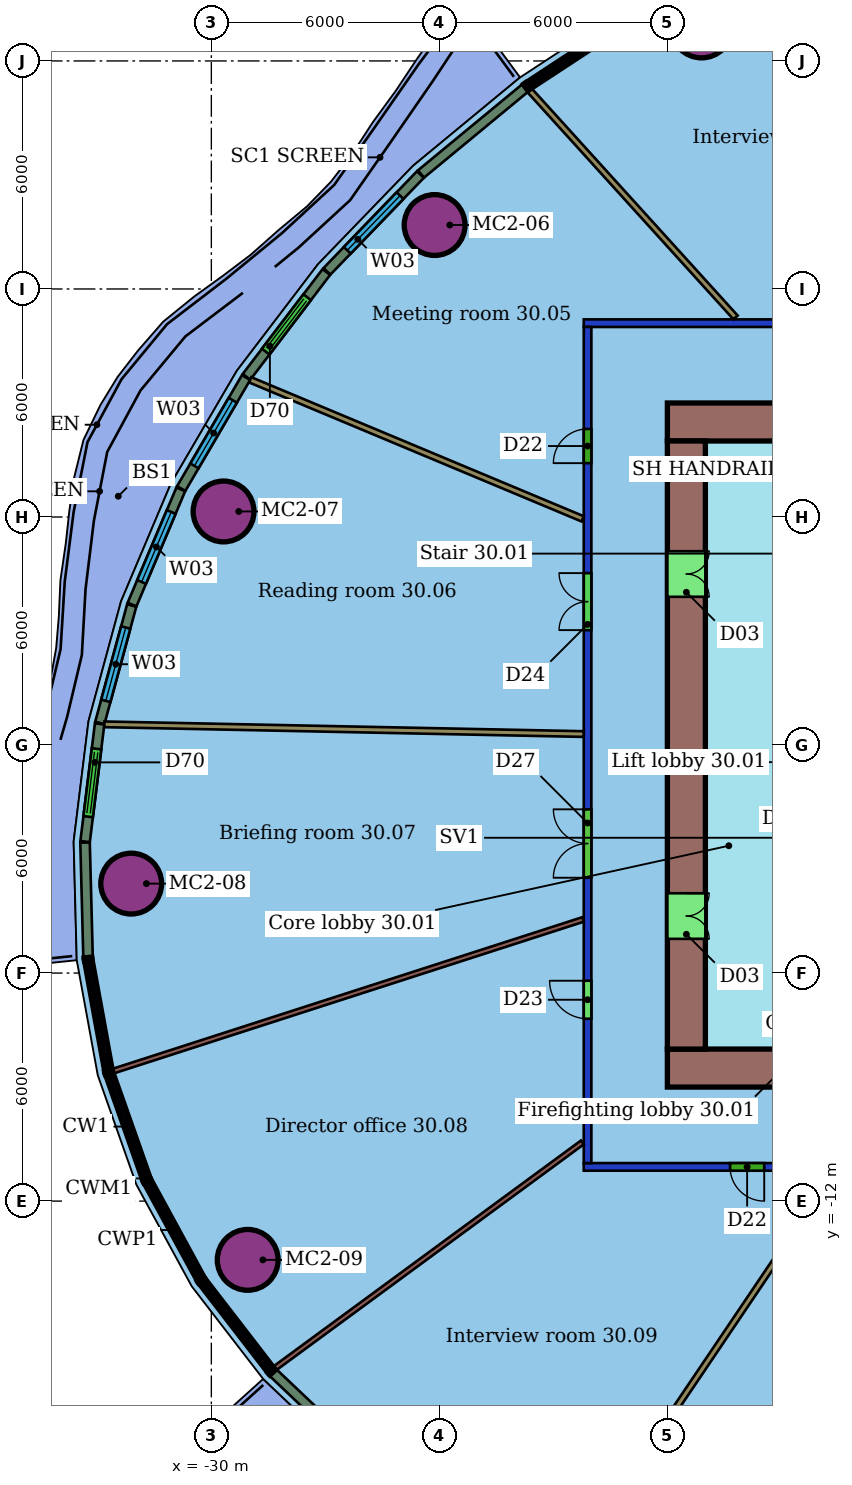
"""IFC4 building model, lengths in metres.
Left out: names, types, materials, properties, quantities, classifications, styles, units other than length and angle.
Written with IfcOpenShell. Run it as: python <this file> out.ifc"""

import sys

from ifc_helpers import new_model, si_unit, direction, frame, frame_2d, origin, origin_2d, place, context, subcontext, project, spatial, rectangle, hollow_circle, extrude, element, fill, save


model = new_model("IFC4")
c1 = context("Model", 3, precision=1e-05, world=origin(), true_north=direction((0.0, 1.0)))
c2 = subcontext(c1, "Body", "Model", "MODEL_VIEW")
j1 = project(units=[si_unit("LENGTHUNIT", "METRE"), si_unit("PLANEANGLEUNIT", "RADIAN")], contexts=[c1])
p1 = place(None, origin())
s1 = spatial("IfcSite", under=j1, at=p1, CompositionType="ELEMENT")
p2 = place(p1, origin())
s2 = spatial("IfcBuilding", under=s1, at=p2, CompositionType="ELEMENT")
p3 = place(p2, frame((0.0, 0.0, 128.2)))
s3 = spatial("IfcBuildingStorey", under=s2, at=p3, CompositionType="ELEMENT", Elevation=128.2)
for number, where, z_axis, x_axis in (
    (1, (-17.1, 18.881, 0.0), (0.0, 0.0, 1.0), (1.0, 0.0, 0.0)),
    (2, (-24.125, 13.683, 0.0), (0.0, 0.0, 1.0), (1.0, 0.0, 0.0)),
    (3, (-29.679, 6.146, 0.0), (0.0, 0.0, 1.0), (1.0, 0.0, 0.0)),
    (4, (-32.109, -3.646, 0.0), (0.0, 0.0, 1.0), (1.0, 0.0, 0.0)),
    (5, (-29.043, -13.547, 0.0), (0.0, 0.0, 1.0), (1.0, 0.0, 0.0)),
):
    element("IfcColumn", number, at=place(p3, frame(where, z_axis=z_axis, x_axis=x_axis)), inside=s3, PredefinedType="COLUMN", context=c2, shape_type="SweptSolid", body=[
        extrude(hollow_circle(Radius=0.8, WallThickness=0.055, at=origin_2d()), origin(), (0.0, 0.0, 1.0), 3.45),
    ])
p4 = place(p3, frame((8.2, -11.1, 0.0), z_axis=(0.0, 0.0, 1.0), x_axis=(-1.0, 0.0, 0.0)))
e6 = element("IfcWall", 6, at=p4, inside=s3, PredefinedType="PARTITIONING", context=c2, shape_type="SweptSolid", body=[
    extrude(rectangle(XDim=28.4, YDim=0.2, at=frame_2d((14.2, 0.0))), origin(), (0.0, 0.0, 1.0), 3.0),
])
p5 = place(p4, frame((23.651, 0.0, 0.0)))
e7 = element("IfcOpeningElement", 7, at=p5, cuts=e6, PredefinedType="OPENING", context=c2, shape_type="SweptSolid", body=[
    extrude(rectangle(XDim=0.9, YDim=2.1, at=frame_2d((0.45, 1.05))), frame((0.0, 0.11, 0.0), z_axis=(0.0, -1.0, 0.0), x_axis=(1.0, 0.0, 0.0)), (0.0, 0.0, 1.0), 0.22),
])
p6 = place(p4, frame((19.365, 0.0, 0.0)))
e8 = element("IfcOpeningElement", 8, at=p6, cuts=e6, PredefinedType="OPENING", context=c2, shape_type="SweptSolid", body=[
    extrude(rectangle(XDim=0.9, YDim=2.1, at=frame_2d((0.45, 1.05))), frame((0.0, 0.11, 0.0), z_axis=(0.0, -1.0, 0.0), x_axis=(1.0, 0.0, 0.0)), (0.0, 0.0, 1.0), 0.22),
])
p7 = place(p4, frame((14.083, 0.0, 0.0)))
e9 = element("IfcOpeningElement", 9, at=p7, cuts=e6, PredefinedType="OPENING", context=c2, shape_type="SweptSolid", body=[
    extrude(rectangle(XDim=0.9, YDim=2.1, at=frame_2d((0.45, 1.05))), frame((0.0, 0.11, 0.0), z_axis=(0.0, -1.0, 0.0), x_axis=(1.0, 0.0, 0.0)), (0.0, 0.0, 1.0), 0.22),
])
p8 = place(p4, frame((8.278, 0.0, 0.0)))
e10 = element("IfcOpeningElement", 10, at=p8, cuts=e6, PredefinedType="OPENING", context=c2, shape_type="SweptSolid", body=[
    extrude(rectangle(XDim=0.9, YDim=2.1, at=frame_2d((0.45, 1.05))), frame((0.0, 0.11, 0.0), z_axis=(0.0, -1.0, 0.0), x_axis=(1.0, 0.0, 0.0)), (0.0, 0.0, 1.0), 0.22),
])
p9 = place(p3, frame((-20.1, -11.0, 0.0), z_axis=(0.0, 0.0, 1.0), x_axis=(0.0, 1.0, 0.0)))
e11 = element("IfcWall", 11, at=p9, inside=s3, PredefinedType="PARTITIONING", context=c2, shape_type="SweptSolid", body=[
    extrude(rectangle(XDim=22.0, YDim=0.2, at=frame_2d((11.0, 0.0))), origin(), (0.0, 0.0, 1.0), 3.0),
])
p10 = place(p9, frame((18.417, 0.0, 0.0)))
e12 = element("IfcOpeningElement", 12, at=p10, cuts=e11, PredefinedType="OPENING", context=c2, shape_type="SweptSolid", body=[
    extrude(rectangle(XDim=0.9, YDim=2.1, at=frame_2d((0.45, 1.05))), frame((0.0, 0.11, 0.0), z_axis=(0.0, -1.0, 0.0), x_axis=(1.0, 0.0, 0.0)), (0.0, 0.0, 1.0), 0.22),
])
p11 = place(p9, frame((14.024, 0.0, 0.0)))
e13 = element("IfcOpeningElement", 13, at=p11, cuts=e11, PredefinedType="OPENING", context=c2, shape_type="SweptSolid", body=[
    extrude(rectangle(XDim=1.5, YDim=2.1, at=frame_2d((0.75, 1.05))), frame((0.0, 0.11, 0.0), z_axis=(0.0, -1.0, 0.0), x_axis=(1.0, 0.0, 0.0)), (0.0, 0.0, 1.0), 0.22),
])
p12 = place(p9, frame((7.508, 0.0, 0.0)))
e14 = element("IfcOpeningElement", 14, at=p12, cuts=e11, PredefinedType="OPENING", context=c2, shape_type="SweptSolid", body=[
    extrude(rectangle(XDim=1.8, YDim=2.4, at=frame_2d((0.9, 1.2))), frame((0.0, 0.11, 0.0), z_axis=(0.0, -1.0, 0.0), x_axis=(1.0, 0.0, 0.0)), (0.0, 0.0, 1.0), 0.22),
])
p13 = place(p9, frame((3.798, 0.0, 0.0)))
e15 = element("IfcOpeningElement", 15, at=p13, cuts=e11, PredefinedType="OPENING", context=c2, shape_type="SweptSolid", body=[
    extrude(rectangle(XDim=1.0, YDim=2.4, at=frame_2d((0.5, 1.2))), frame((0.0, 0.11, 0.0), z_axis=(0.0, -1.0, 0.0), x_axis=(1.0, 0.0, 0.0)), (0.0, 0.0, 1.0), 0.22),
])
p14 = place(p3, frame((-20.2, 11.1, 0.0), z_axis=(0.0, 0.0, 1.0), x_axis=(1.0, 0.0, 0.0)))
e16 = element("IfcWall", 16, at=p14, inside=s3, PredefinedType="PARTITIONING", context=c2, shape_type="SweptSolid", body=[
    extrude(rectangle(XDim=28.4, YDim=0.2, at=frame_2d((14.2, 0.0))), origin(), (0.0, 0.0, 1.0), 3.0),
])
p15 = place(p14, frame((23.376, 0.0, 0.0)))
e17 = element("IfcOpeningElement", 17, at=p15, cuts=e16, PredefinedType="OPENING", context=c2, shape_type="SweptSolid", body=[
    extrude(rectangle(XDim=1.8, YDim=2.4, at=frame_2d((0.9, 1.2))), frame((0.0, 0.11, 0.0), z_axis=(0.0, -1.0, 0.0), x_axis=(1.0, 0.0, 0.0)), (0.0, 0.0, 1.0), 0.22),
])
p16 = place(p14, frame((19.3, 0.0, 0.0)))
e18 = element("IfcOpeningElement", 18, at=p16, cuts=e16, PredefinedType="OPENING", context=c2, shape_type="SweptSolid", body=[
    extrude(rectangle(XDim=1.0, YDim=2.4, at=frame_2d((0.5, 1.2))), frame((0.0, 0.11, 0.0), z_axis=(0.0, -1.0, 0.0), x_axis=(1.0, 0.0, 0.0)), (0.0, 0.0, 1.0), 0.22),
])
p17 = place(p14, frame((12.52, 0.0, 0.0)))
e19 = element("IfcOpeningElement", 19, at=p17, cuts=e16, PredefinedType="OPENING", context=c2, shape_type="SweptSolid", body=[
    extrude(rectangle(XDim=1.5, YDim=2.1, at=frame_2d((0.75, 1.05))), frame((0.0, 0.11, 0.0), z_axis=(0.0, -1.0, 0.0), x_axis=(1.0, 0.0, 0.0)), (0.0, 0.0, 1.0), 0.22),
])
p18 = place(p14, frame((8.278, 0.0, 0.0)))
e20 = element("IfcOpeningElement", 20, at=p18, cuts=e16, PredefinedType="OPENING", context=c2, shape_type="SweptSolid", body=[
    extrude(rectangle(XDim=0.9, YDim=2.1, at=frame_2d((0.45, 1.05))), frame((0.0, 0.11, 0.0), z_axis=(0.0, -1.0, 0.0), x_axis=(1.0, 0.0, 0.0)), (0.0, 0.0, 1.0), 0.22),
])
p19 = place(p3, frame((-21.624, 17.224, 0.0), z_axis=(0.0, 0.0, 1.0), x_axis=(0.671881371933, -0.740658775719, 0.0)))
e21 = element("IfcWall", 21, at=p19, inside=s3, PredefinedType="PARTITIONING", context=c2, shape_type="SweptSolid", body=[
    extrude(rectangle(XDim=8.065, YDim=0.15, at=frame_2d((4.032, 0.0))), origin(), (0.0, 0.0, 1.0), 3.45),
])
p20 = place(p3, frame((-28.977, 9.609, 0.0), z_axis=(0.0, 0.0, 1.0), x_axis=(0.922568046732, -0.385834419343, 0.0)))
e22 = element("IfcWall", 22, at=p20, inside=s3, PredefinedType="PARTITIONING", context=c2, shape_type="SweptSolid", body=[
    extrude(rectangle(XDim=9.482, YDim=0.15, at=frame_2d((4.741, 0.0))), origin(), (0.0, 0.0, 1.0), 3.45),
])
p21 = place(p3, frame((-32.815, 0.545, 0.0), z_axis=(0.0, 0.0, 1.0), x_axis=(0.999793955869, -0.020298911485, 0.0)))
e23 = element("IfcWall", 23, at=p21, inside=s3, PredefinedType="PARTITIONING", context=c2, shape_type="SweptSolid", body=[
    extrude(rectangle(XDim=12.617, YDim=0.15, at=frame_2d((6.308, 0.0))), origin(), (0.0, 0.0, 1.0), 3.45),
])
p22 = place(p3, frame((-32.578, -8.578, 0.0), z_axis=(0.0, 0.0, 1.0), x_axis=(0.951657398176, 0.307161515325, 0.0)))
e24 = element("IfcWall", 24, at=p22, inside=s3, PredefinedType="PARTITIONING", context=c2, shape_type="SweptSolid", body=[
    extrude(rectangle(XDim=12.987, YDim=0.125, at=frame_2d((6.493, 0.0))), origin(), (0.0, 0.0, 1.0), 3.45),
])
p23 = place(p3, frame((-28.321, -16.394, 0.0), z_axis=(0.0, 0.0, 1.0), x_axis=(0.805953622815, 0.591978680251, 0.0)))
e25 = element("IfcWall", 25, at=p23, inside=s3, PredefinedType="PARTITIONING", context=c2, shape_type="SweptSolid", body=[
    extrude(rectangle(XDim=10.03, YDim=0.125, at=frame_2d((5.015, 0.0))), origin(), (0.0, 0.0, 1.0), 3.45),
])
p24 = place(p3, frame((-20.673, -21.74, 0.0), z_axis=(0.0, 0.0, 1.0), x_axis=(0.559424188475, 0.828881521901, 0.0)))
e26 = element("IfcWall", 26, at=p24, inside=s3, PredefinedType="PARTITIONING", context=c2, shape_type="SweptSolid", body=[
    extrude(rectangle(XDim=12.666, YDim=0.15, at=frame_2d((6.333, 0.0))), origin(), (0.0, 0.0, 1.0), 3.45),
])
p25 = place(p3, frame((-21.74, 17.29, 0.0), z_axis=(0.0, 0.0, 1.0), x_axis=(-0.771117086356, -0.636693363503, 0.0)))
e27 = element("IfcWall", 27, at=p25, inside=s3, PredefinedType="SOLIDWALL", context=c2, shape_type="SweptSolid", body=[
    extrude(rectangle(XDim=3.556, YDim=0.25, at=frame_2d((1.778, 0.0))), origin(), (0.0, 0.0, 1.0), 3.05),
])
p26 = place(p3, frame((-24.499, 15.01, 0.0), z_axis=(0.0, 0.0, 1.0), x_axis=(-0.69458713087, -0.719408588793, 0.0)))
e28 = element("IfcWall", 28, at=p26, inside=s3, PredefinedType="SOLIDWALL", context=c2, shape_type="SweptSolid", body=[
    extrude(rectangle(XDim=3.541, YDim=0.25, at=frame_2d((1.771, 0.0))), origin(), (0.0, 0.0, 1.0), 3.05),
])
p27 = place(p26, frame((0.771, 0.0, 0.9)))
e29 = element("IfcOpeningElement", 29, at=p27, cuts=e28, PredefinedType="OPENING", context=c2, shape_type="SweptSolid", body=[
    extrude(rectangle(XDim=2.0, YDim=2.1, at=frame_2d((1.0, 1.05))), frame((0.0, 0.135, 0.0), z_axis=(0.0, -1.0, 0.0), x_axis=(1.0, 0.0, 0.0)), (0.0, 0.0, 1.0), 0.27),
])
p28 = place(p3, frame((-26.973, 12.446, 0.0), z_axis=(0.0, 0.0, 1.0), x_axis=(-0.605977439261, -0.795481830784, 0.0)))
e30 = element("IfcWall", 30, at=p28, inside=s3, PredefinedType="SOLIDWALL", context=c2, shape_type="SweptSolid", body=[
    extrude(rectangle(XDim=3.467, YDim=0.25, at=frame_2d((1.733, 0.0))), origin(), (0.0, 0.0, 1.0), 3.05),
])
p29 = place(p28, frame((0.833, 0.0, 0.0)))
e31 = element("IfcOpeningElement", 31, at=p29, cuts=e30, PredefinedType="OPENING", context=c2, shape_type="SweptSolid", body=[
    extrude(rectangle(XDim=1.8, YDim=2.4, at=frame_2d((0.9, 1.2))), frame((0.0, 0.135, 0.0), z_axis=(0.0, -1.0, 0.0), x_axis=(1.0, 0.0, 0.0)), (0.0, 0.0, 1.0), 0.27),
])
p30 = place(p3, frame((-29.087, 9.669, 0.0), z_axis=(0.0, 0.0, 1.0), x_axis=(-0.504503728062, -0.863409513714, 0.0)))
e32 = element("IfcWall", 32, at=p30, inside=s3, PredefinedType="SOLIDWALL", context=c2, shape_type="SweptSolid", body=[
    extrude(rectangle(XDim=3.382, YDim=0.25, at=frame_2d((1.691, 0.0))), origin(), (0.0, 0.0, 1.0), 3.05),
])
p31 = place(p30, frame((0.691, 0.0, 0.9)))
e33 = element("IfcOpeningElement", 33, at=p31, cuts=e32, PredefinedType="OPENING", context=c2, shape_type="SweptSolid", body=[
    extrude(rectangle(XDim=2.0, YDim=2.1, at=frame_2d((1.0, 1.05))), frame((0.0, 0.135, 0.0), z_axis=(0.0, -1.0, 0.0), x_axis=(1.0, 0.0, 0.0)), (0.0, 0.0, 1.0), 0.27),
])
p32 = place(p3, frame((-30.804, 6.727, 0.0), z_axis=(0.0, 0.0, 1.0), x_axis=(-0.389780302429, -0.920907875869, 0.0)))
e34 = element("IfcWall", 34, at=p32, inside=s3, PredefinedType="SOLIDWALL", context=c2, shape_type="SweptSolid", body=[
    extrude(rectangle(XDim=3.292, YDim=0.25, at=frame_2d((1.646, 0.0))), origin(), (0.0, 0.0, 1.0), 3.05),
])
p33 = place(p32, frame((0.646, 0.0, 0.9)))
e35 = element("IfcOpeningElement", 35, at=p33, cuts=e34, PredefinedType="OPENING", context=c2, shape_type="SweptSolid", body=[
    extrude(rectangle(XDim=2.0, YDim=2.1, at=frame_2d((1.0, 1.05))), frame((0.0, 0.135, 0.0), z_axis=(0.0, -1.0, 0.0), x_axis=(1.0, 0.0, 0.0)), (0.0, 0.0, 1.0), 0.27),
])
p34 = place(p3, frame((-32.095, 3.672, 0.0), z_axis=(0.0, 0.0, 1.0), x_axis=(-0.262091620012, -0.96504299527, 0.0)))
e36 = element("IfcWall", 36, at=p34, inside=s3, PredefinedType="SOLIDWALL", context=c2, shape_type="SweptSolid", body=[
    extrude(rectangle(XDim=3.203, YDim=0.25, at=frame_2d((1.601, 0.0))), origin(), (0.0, 0.0, 1.0), 3.05),
])
p35 = place(p34, frame((0.601, 0.0, 0.9)))
e37 = element("IfcOpeningElement", 37, at=p35, cuts=e36, PredefinedType="OPENING", context=c2, shape_type="SweptSolid", body=[
    extrude(rectangle(XDim=2.0, YDim=2.1, at=frame_2d((1.0, 1.05))), frame((0.0, 0.135, 0.0), z_axis=(0.0, -1.0, 0.0), x_axis=(1.0, 0.0, 0.0)), (0.0, 0.0, 1.0), 0.27),
])
p36 = place(p3, frame((-32.94, 0.556, 0.0), z_axis=(0.0, 0.0, 1.0), x_axis=(-0.122609350435, -0.992455010157, 0.0)))
e38 = element("IfcWall", 38, at=p36, inside=s3, PredefinedType="SOLIDWALL", context=c2, shape_type="SweptSolid", body=[
    extrude(rectangle(XDim=3.12, YDim=0.25, at=frame_2d((1.56, 0.0))), origin(), (0.0, 0.0, 1.0), 3.05),
])
p37 = place(p36, frame((0.66, 0.0, 0.0)))
e39 = element("IfcOpeningElement", 39, at=p37, cuts=e38, PredefinedType="OPENING", context=c2, shape_type="SweptSolid", body=[
    extrude(rectangle(XDim=1.8, YDim=2.4, at=frame_2d((0.9, 1.2))), frame((0.0, 0.135, 0.0), z_axis=(0.0, -1.0, 0.0), x_axis=(1.0, 0.0, 0.0)), (0.0, 0.0, 1.0), 0.27),
])
for number, where, z_axis, x_axis in (
    (40, (-33.323, -2.567, 0.0), (0.0, 0.0, 1.0), (0.026, -1.0, 0.0)),
    (41, (-28.374, -16.516, 0.0), (0.0, 0.0, 1.0), (0.725, -0.688, 0.0)),
):
    element("IfcWall", number, at=place(p3, frame(where, z_axis=z_axis, x_axis=x_axis)), inside=s3, PredefinedType="SOLIDWALL", context=c2, shape_type="SweptSolid", body=[
        extrude(rectangle(XDim=3.01, YDim=0.25, at=frame_2d((1.505, 0.0))), origin(), (0.0, 0.0, 1.0), 3.05),
    ])
p38 = place(p3, frame((-6.0, 8.5, 0.0), z_axis=(0.0, 0.0, 1.0), x_axis=(-1.0, 0.0, 0.0)))
e42 = element("IfcWall", 42, at=p38, inside=s3, PredefinedType="SHEAR", context=c2, shape_type="SweptSolid", body=[
    extrude(rectangle(XDim=12.0, YDim=1.0, at=frame_2d((6.0, 0.0))), origin(), (0.0, 0.0, 1.0), 3.3),
])
p39 = place(p38, frame((5.2, 0.0, 0.0)))
e43 = element("IfcOpeningElement", 43, at=p39, cuts=e42, PredefinedType="OPENING", context=c2, shape_type="SweptSolid", body=[
    extrude(rectangle(XDim=1.2, YDim=2.1, at=frame_2d((0.6, 1.05))), frame((0.0, 0.51, 0.0), z_axis=(0.0, -1.0, 0.0), x_axis=(1.0, 0.0, 0.0)), (0.0, 0.0, 1.0), 1.02),
])
p40 = place(p3, frame((-18.0, -8.5, 0.0), z_axis=(0.0, 0.0, 1.0), x_axis=(1.0, 0.0, 0.0)))
e44 = element("IfcWall", 44, at=p40, inside=s3, PredefinedType="SHEAR", context=c2, shape_type="SweptSolid", body=[
    extrude(rectangle(XDim=24.0, YDim=1.0, at=frame_2d((12.0, 0.0))), origin(), (0.0, 0.0, 1.0), 3.3),
])
p41 = place(p40, frame((6.0, 0.0, 0.0)))
e45 = element("IfcOpeningElement", 45, at=p41, cuts=e44, PredefinedType="OPENING", context=c2, shape_type="SweptSolid", body=[
    extrude(rectangle(XDim=1.2, YDim=2.1, at=frame_2d((0.6, 1.05))), frame((0.0, 0.51, 0.0), z_axis=(0.0, -1.0, 0.0), x_axis=(1.0, 0.0, 0.0)), (0.0, 0.0, 1.0), 1.02),
])
p42 = place(p3, frame((-17.5, 8.0, 0.0), z_axis=(0.0, 0.0, 1.0), x_axis=(0.0, -1.0, 0.0)))
e46 = element("IfcWall", 46, at=p42, inside=s3, PredefinedType="SHEAR", context=c2, shape_type="SweptSolid", body=[
    extrude(rectangle(XDim=16.0, YDim=1.0, at=frame_2d((8.0, 0.0))), origin(), (0.0, 0.0, 1.0), 3.3),
])
p43 = place(p42, frame((11.9, 0.0, 0.0)))
e47 = element("IfcOpeningElement", 47, at=p43, cuts=e46, PredefinedType="OPENING", context=c2, shape_type="SweptSolid", body=[
    extrude(rectangle(XDim=1.2, YDim=2.1, at=frame_2d((0.6, 1.05))), frame((0.0, 0.51, 0.0), z_axis=(0.0, -1.0, 0.0), x_axis=(1.0, 0.0, 0.0)), (0.0, 0.0, 1.0), 1.02),
])
p44 = place(p42, frame((2.9, 0.0, 0.0)))
e48 = element("IfcOpeningElement", 48, at=p44, cuts=e46, PredefinedType="OPENING", context=c2, shape_type="SweptSolid", body=[
    extrude(rectangle(XDim=1.2, YDim=2.1, at=frame_2d((0.6, 1.05))), frame((0.0, 0.51, 0.0), z_axis=(0.0, -1.0, 0.0), x_axis=(1.0, 0.0, 0.0)), (0.0, 0.0, 1.0), 1.02),
])
p45 = place(p10, origin())
e49 = element("IfcDoor", 49, at=p45, inside=s3, OperationType="SINGLE_SWING_LEFT", PredefinedType="DOOR", context=c2, shape_type="SweptSolid", body=[
    extrude(rectangle(XDim=0.9, YDim=2.1, at=frame_2d((0.45, 1.05))), frame((0.0, 0.025, 0.0), z_axis=(0.0, -1.0, 0.0), x_axis=(1.0, 0.0, 0.0)), (0.0, 0.0, 1.0), 0.05),
])
fill(e12, e49)
p46 = place(p11, origin())
e50 = element("IfcDoor", 50, at=p46, inside=s3, OperationType="DOUBLE_DOOR_SINGLE_SWING", PredefinedType="DOOR", context=c2, shape_type="SweptSolid", body=[
    extrude(rectangle(XDim=1.5, YDim=2.1, at=frame_2d((0.75, 1.05))), frame((0.0, 0.025, 0.0), z_axis=(0.0, -1.0, 0.0), x_axis=(1.0, 0.0, 0.0)), (0.0, 0.0, 1.0), 0.05),
])
fill(e13, e50)
p47 = place(p12, origin())
e51 = element("IfcDoor", 51, at=p47, inside=s3, OperationType="DOUBLE_DOOR_SINGLE_SWING", PredefinedType="DOOR", context=c2, shape_type="SweptSolid", body=[
    extrude(rectangle(XDim=1.8, YDim=2.4, at=frame_2d((0.9, 1.2))), frame((0.0, 0.025, 0.0), z_axis=(0.0, -1.0, 0.0), x_axis=(1.0, 0.0, 0.0)), (0.0, 0.0, 1.0), 0.05),
])
fill(e14, e51)
p48 = place(p13, origin())
e52 = element("IfcDoor", 52, at=p48, inside=s3, OperationType="SINGLE_SWING_RIGHT", PredefinedType="DOOR", context=c2, shape_type="SweptSolid", body=[
    extrude(rectangle(XDim=1.0, YDim=2.4, at=frame_2d((0.5, 1.2))), frame((0.0, 0.025, 0.0), z_axis=(0.0, -1.0, 0.0), x_axis=(1.0, 0.0, 0.0)), (0.0, 0.0, 1.0), 0.05),
])
fill(e15, e52)
p49 = place(p5, origin())
e53 = element("IfcDoor", 53, at=p49, inside=s3, OperationType="SINGLE_SWING_LEFT", PredefinedType="DOOR", context=c2, shape_type="SweptSolid", body=[
    extrude(rectangle(XDim=0.9, YDim=2.1, at=frame_2d((0.45, 1.05))), frame((0.0, 0.025, 0.0), z_axis=(0.0, -1.0, 0.0), x_axis=(1.0, 0.0, 0.0)), (0.0, 0.0, 1.0), 0.05),
])
fill(e7, e53)
p50 = place(p27, origin())
e54 = element("IfcWindow", 54, at=p50, inside=s3, PartitioningType="SINGLE_PANEL", PredefinedType="WINDOW", context=c2, shape_type="SweptSolid", body=[
    extrude(rectangle(XDim=2.0, YDim=2.1, at=frame_2d((1.0, 1.05))), frame((0.0, 0.03, 0.0), z_axis=(0.0, -1.0, 0.0), x_axis=(1.0, 0.0, 0.0)), (0.0, 0.0, 1.0), 0.06),
])
fill(e29, e54)
p51 = place(p29, origin())
e55 = element("IfcDoor", 55, at=p51, inside=s3, OperationType="DOUBLE_DOOR_SLIDING", PredefinedType="DOOR", context=c2, shape_type="SweptSolid", body=[
    extrude(rectangle(XDim=1.8, YDim=2.4, at=frame_2d((0.9, 1.2))), frame((0.0, 0.025, 0.0), z_axis=(0.0, -1.0, 0.0), x_axis=(1.0, 0.0, 0.0)), (0.0, 0.0, 1.0), 0.05),
])
fill(e31, e55)
p52 = place(p31, origin())
e56 = element("IfcWindow", 56, at=p52, inside=s3, PartitioningType="SINGLE_PANEL", PredefinedType="WINDOW", context=c2, shape_type="SweptSolid", body=[
    extrude(rectangle(XDim=2.0, YDim=2.1, at=frame_2d((1.0, 1.05))), frame((0.0, 0.03, 0.0), z_axis=(0.0, -1.0, 0.0), x_axis=(1.0, 0.0, 0.0)), (0.0, 0.0, 1.0), 0.06),
])
fill(e33, e56)
p53 = place(p33, origin())
e57 = element("IfcWindow", 57, at=p53, inside=s3, PartitioningType="SINGLE_PANEL", PredefinedType="WINDOW", context=c2, shape_type="SweptSolid", body=[
    extrude(rectangle(XDim=2.0, YDim=2.1, at=frame_2d((1.0, 1.05))), frame((0.0, 0.03, 0.0), z_axis=(0.0, -1.0, 0.0), x_axis=(1.0, 0.0, 0.0)), (0.0, 0.0, 1.0), 0.06),
])
fill(e35, e57)
p54 = place(p35, origin())
e58 = element("IfcWindow", 58, at=p54, inside=s3, PartitioningType="SINGLE_PANEL", PredefinedType="WINDOW", context=c2, shape_type="SweptSolid", body=[
    extrude(rectangle(XDim=2.0, YDim=2.1, at=frame_2d((1.0, 1.05))), frame((0.0, 0.03, 0.0), z_axis=(0.0, -1.0, 0.0), x_axis=(1.0, 0.0, 0.0)), (0.0, 0.0, 1.0), 0.06),
])
fill(e37, e58)
p55 = place(p37, origin())
e59 = element("IfcDoor", 59, at=p55, inside=s3, OperationType="DOUBLE_DOOR_SLIDING", PredefinedType="DOOR", context=c2, shape_type="SweptSolid", body=[
    extrude(rectangle(XDim=1.8, YDim=2.4, at=frame_2d((0.9, 1.2))), frame((0.0, 0.025, 0.0), z_axis=(0.0, -1.0, 0.0), x_axis=(1.0, 0.0, 0.0)), (0.0, 0.0, 1.0), 0.05),
])
fill(e39, e59)
p56 = place(p43, origin())
e60 = element("IfcDoor", 60, at=p56, inside=s3, OperationType="DOUBLE_DOOR_SINGLE_SWING", PredefinedType="NOTDEFINED", context=c2, shape_type="SweptSolid", body=[
    extrude(rectangle(XDim=1.2, YDim=2.1, at=frame_2d((0.6, 1.05))), frame((0.0, 0.025, 0.0), z_axis=(0.0, -1.0, 0.0), x_axis=(1.0, 0.0, 0.0)), (0.0, 0.0, 1.0), 0.05),
])
fill(e47, e60)
p57 = place(p44, origin())
e61 = element("IfcDoor", 61, at=p57, inside=s3, OperationType="DOUBLE_DOOR_SINGLE_SWING", PredefinedType="NOTDEFINED", context=c2, shape_type="SweptSolid", body=[
    extrude(rectangle(XDim=1.2, YDim=2.1, at=frame_2d((0.6, 1.05))), frame((0.0, 0.025, 0.0), z_axis=(0.0, -1.0, 0.0), x_axis=(1.0, 0.0, 0.0)), (0.0, 0.0, 1.0), 0.05),
])
fill(e48, e61)
save(model, sys.argv[1])
